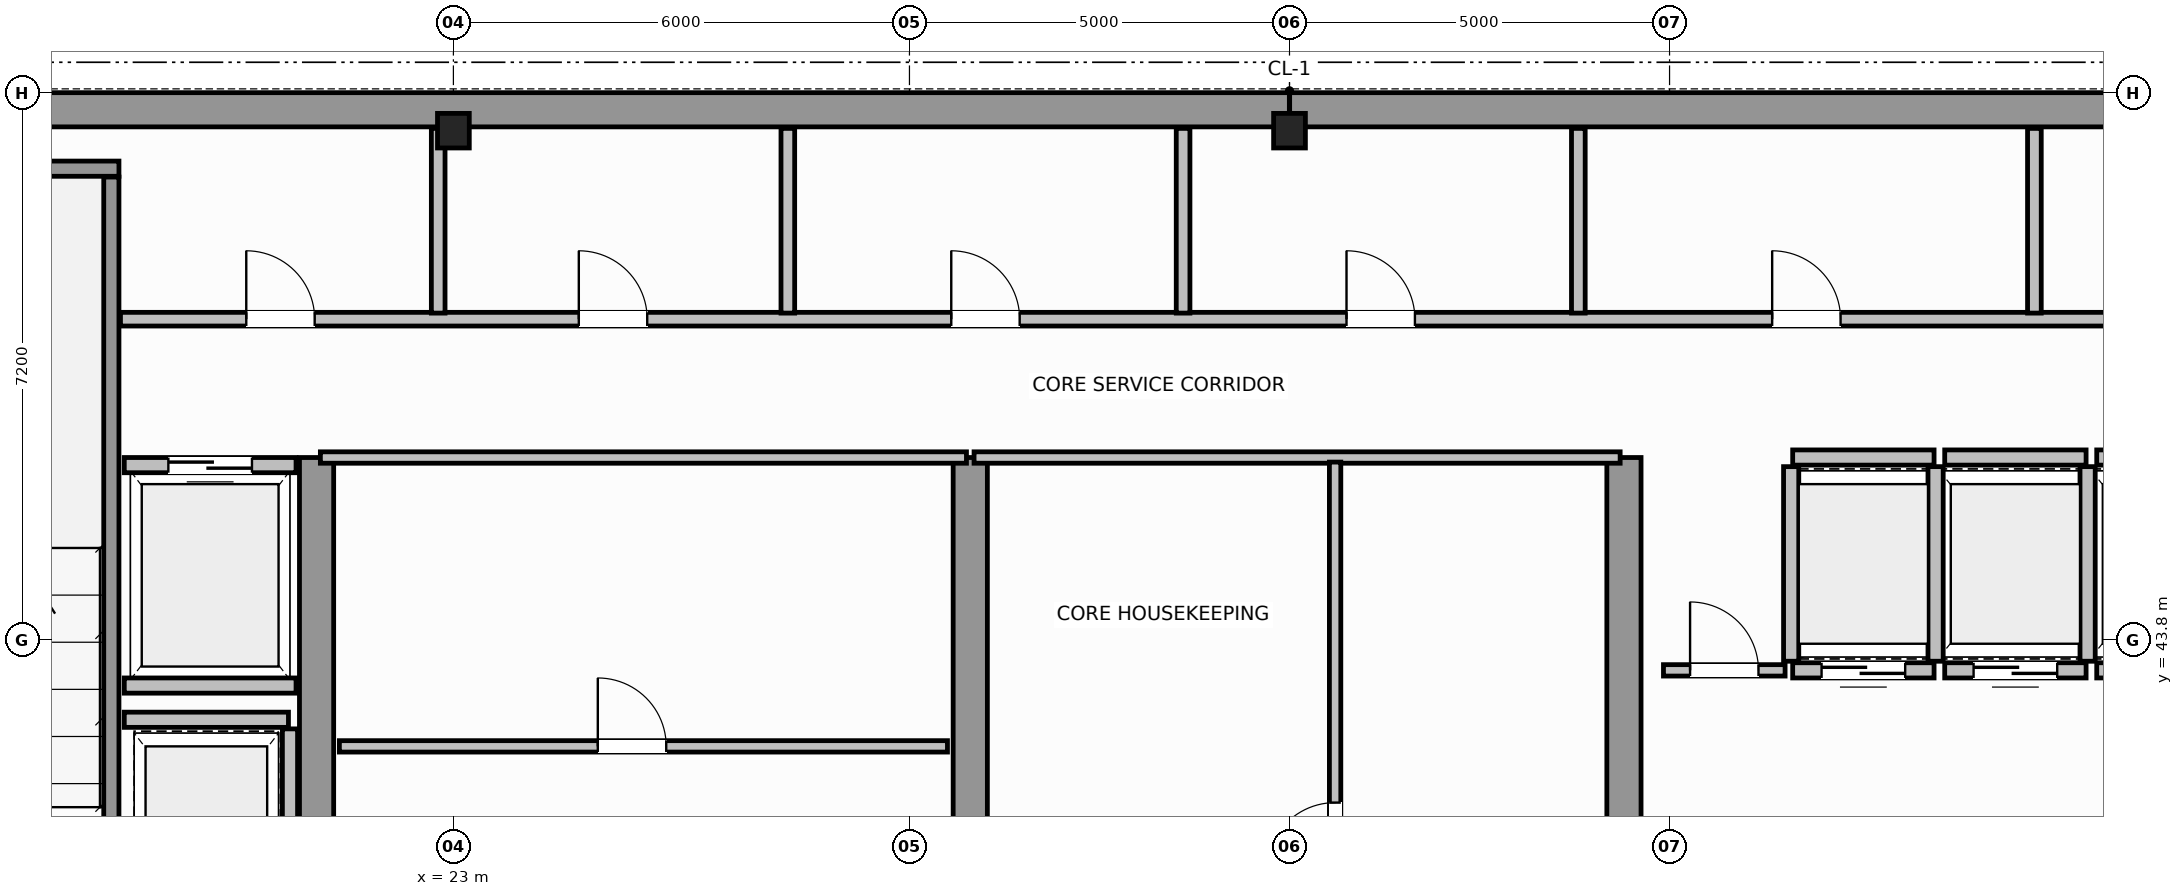
"""IFC4 building model, lengths in metres.
Left out: names, types, materials, properties, quantities, classifications, styles, units other than length and angle.
Written with IfcOpenShell. Run it as: python <this file> out.ifc"""

import sys

from ifc_helpers import new_model, si_unit, direction, frame, frame_2d, origin, origin_2d, place, context, subcontext, project, spatial, rectangle, i_section, extrude, source, transform, mapped, element, fill, save


model = new_model("IFC4")
c1 = context("Model", 3, precision=1e-05, world=origin(), true_north=direction((0.0, 1.0)))
c2 = subcontext(c1, "Body", "Model", "MODEL_VIEW")
j1 = project(units=[si_unit("LENGTHUNIT", "METRE"), si_unit("PLANEANGLEUNIT", "RADIAN")], contexts=[c1])
p1 = place(None, origin())
s1 = spatial("IfcSite", under=j1, at=p1, CompositionType="ELEMENT")
p2 = place(p1, origin())
s2 = spatial("IfcBuilding", under=s1, at=p2, CompositionType="ELEMENT")
p3 = place(p2, frame((0.0, 0.0, 265.0)))
s3 = spatial("IfcBuildingStorey", under=s2, at=p3, CompositionType="ELEMENT", Elevation=265.0)
m1 = source(origin(), c2, "Body", "SweptSolid", [
    extrude(i_section(OverallWidth=0.418, OverallDepth=0.455, WebThickness=0.042, FlangeThickness=0.058, FilletRadius=0.015, at=origin_2d()), origin(), (0.0, 0.0, 1.0), 3.8),
])
for number, where, z_axis, x_axis in (
    (1, (23.0, 50.5, 0.0), (0.0, 0.0, 1.0), (1.0, 0.0, 0.0)),
    (2, (34.0, 50.5, 0.0), (0.0, 0.0, 1.0), (1.0, 0.0, 0.0)),
):
    element("IfcColumn", number, at=place(p3, frame(where, z_axis=z_axis, x_axis=x_axis)), inside=s3, PredefinedType="COLUMN", context=c2, shape_type="MappedRepresentation", body=[
        mapped(m1, transform((0.0, 0.0, 0.0), scale=1.0)),
    ])
for number, where, z_axis, x_axis in (
    (3, (14.229, 50.775, 0.0), (0.0, 0.0, 1.0), (1.0, 0.0, 0.0)),
    (4, (34.002, 50.775, 0.0), (0.0, 0.0, 1.0), (1.0, 0.0, 0.0)),
):
    element("IfcWall", number, at=place(p3, frame(where, z_axis=z_axis, x_axis=x_axis)), inside=s3, PredefinedType="SHEAR", context=c2, shape_type="SweptSolid", body=[
        extrude(rectangle(XDim=19.769, YDim=0.45, at=frame_2d((9.885, 0.0))), origin(), (0.0, 0.0, 1.0), 3.8),
    ])
for number, where, z_axis, x_axis in (
    (5, (21.2, 36.745, 0.0), (0.0, 0.0, 1.0), (0.0, 1.0, 0.0)),
    (6, (29.8, 36.745, 0.0), (0.0, 0.0, 1.0), (0.0, 1.0, 0.0)),
    (7, (38.4, 36.745, 0.0), (0.0, 0.0, 1.0), (0.0, 1.0, 0.0)),
):
    element("IfcWall", number, at=place(p3, frame(where, z_axis=z_axis, x_axis=x_axis)), inside=s3, PredefinedType="SHEAR", context=c2, shape_type="SweptSolid", body=[
        extrude(rectangle(XDim=9.455, YDim=0.45, at=frame_2d((4.728, 0.0))), origin(), (0.0, 0.0, 1.0), 3.8),
    ])
p4 = place(p3, frame((14.225, 50.0, 0.0), z_axis=(0.0, 0.0, 1.0), x_axis=(1.0, 0.0, 0.0)))
e8 = element("IfcWall", 8, at=p4, inside=s3, PredefinedType="SOLIDWALL", context=c2, shape_type="SweptSolid", body=[
    extrude(rectangle(XDim=4.375, YDim=0.2, at=frame_2d((2.188, 0.0))), origin(), (0.0, 0.0, 1.0), 3.8),
])
p5 = place(p3, frame((18.5, 39.96, 0.0), z_axis=(0.0, 0.0, 1.0), x_axis=(0.0, 1.0, 0.0)))
e9 = element("IfcWall", 9, at=p5, inside=s3, PredefinedType="SOLIDWALL", context=c2, shape_type="SweptSolid", body=[
    extrude(rectangle(XDim=9.93, YDim=0.2, at=frame_2d((4.965, 0.0))), origin(), (0.0, 0.0, 1.0), 3.8),
])
p6 = place(p3, frame((40.62, 43.4, 0.0), z_axis=(0.0, 0.0, 1.0), x_axis=(1.0, 0.0, 0.0)))
e10 = element("IfcWall", 10, at=p6, inside=s3, PredefinedType="SOLIDWALL", context=c2, shape_type="SweptSolid", body=[
    extrude(rectangle(XDim=1.86, YDim=0.2, at=frame_2d((0.93, 0.0))), origin(), (0.0, 0.0, 1.0), 3.58),
])
p7 = place(p6, frame((0.38, 0.0, 0.0)))
e11 = element("IfcOpeningElement", 11, at=p7, cuts=e10, PredefinedType="OPENING", context=c2, shape_type="SweptSolid", body=[
    extrude(rectangle(XDim=1.1, YDim=2.15, at=frame_2d((0.55, 1.075))), frame((0.0, 0.11, 0.0), z_axis=(0.0, -1.0, 0.0), x_axis=(1.0, 0.0, 0.0)), (0.0, 0.0, 1.0), 0.22),
])
p8 = place(p3, frame((40.62, 46.2, 0.0), z_axis=(0.0, 0.0, 1.0), x_axis=(1.0, 0.0, 0.0)))
e12 = element("IfcWall", 12, at=p8, inside=s3, PredefinedType="SOLIDWALL", context=c2, shape_type="SweptSolid", body=[
    extrude(rectangle(XDim=1.86, YDim=0.2, at=frame_2d((0.93, 0.0))), origin(), (0.0, 0.0, 1.0), 3.58),
])
for number, where, z_axis, x_axis in (
    (13, (40.6, 43.52, 0.0), (0.0, 0.0, 1.0), (0.0, 1.0, 0.0)),
    (14, (42.5, 43.52, 0.0), (0.0, 0.0, 1.0), (0.0, 1.0, 0.0)),
):
    element("IfcWall", number, at=place(p3, frame(where, z_axis=z_axis, x_axis=x_axis)), inside=s3, PredefinedType="SOLIDWALL", context=c2, shape_type="SweptSolid", body=[
        extrude(rectangle(XDim=2.56, YDim=0.2, at=frame_2d((1.28, 0.0))), origin(), (0.0, 0.0, 1.0), 3.58),
    ])
p9 = place(p3, frame((42.62, 43.4, 0.0), z_axis=(0.0, 0.0, 1.0), x_axis=(1.0, 0.0, 0.0)))
e15 = element("IfcWall", 15, at=p9, inside=s3, PredefinedType="SOLIDWALL", context=c2, shape_type="SweptSolid", body=[
    extrude(rectangle(XDim=1.86, YDim=0.2, at=frame_2d((0.93, 0.0))), origin(), (0.0, 0.0, 1.0), 3.58),
])
p10 = place(p9, frame((0.38, 0.0, 0.0)))
e16 = element("IfcOpeningElement", 16, at=p10, cuts=e15, PredefinedType="OPENING", context=c2, shape_type="SweptSolid", body=[
    extrude(rectangle(XDim=1.1, YDim=2.15, at=frame_2d((0.55, 1.075))), frame((0.0, 0.11, 0.0), z_axis=(0.0, -1.0, 0.0), x_axis=(1.0, 0.0, 0.0)), (0.0, 0.0, 1.0), 0.22),
])
p11 = place(p3, frame((42.62, 46.2, 0.0), z_axis=(0.0, 0.0, 1.0), x_axis=(1.0, 0.0, 0.0)))
e17 = element("IfcWall", 17, at=p11, inside=s3, PredefinedType="SOLIDWALL", context=c2, shape_type="SweptSolid", body=[
    extrude(rectangle(XDim=1.86, YDim=0.2, at=frame_2d((0.93, 0.0))), origin(), (0.0, 0.0, 1.0), 3.58),
])
p12 = place(p3, frame((44.5, 43.52, 0.0), z_axis=(0.0, 0.0, 1.0), x_axis=(0.0, 1.0, 0.0)))
e18 = element("IfcWall", 18, at=p12, inside=s3, PredefinedType="SOLIDWALL", context=c2, shape_type="SweptSolid", body=[
    extrude(rectangle(XDim=2.56, YDim=0.2, at=frame_2d((1.28, 0.0))), origin(), (0.0, 0.0, 1.0), 2.37),
])
p13 = place(p3, frame((44.62, 43.4, 0.0), z_axis=(0.0, 0.0, 1.0), x_axis=(1.0, 0.0, 0.0)))
e19 = element("IfcWall", 19, at=p13, inside=s3, PredefinedType="SOLIDWALL", context=c2, shape_type="SweptSolid", body=[
    extrude(rectangle(XDim=1.86, YDim=0.2, at=frame_2d((0.93, 0.0))), origin(), (0.0, 0.0, 1.0), 3.58),
])
p14 = place(p13, frame((0.38, 0.0, 0.0)))
e20 = element("IfcOpeningElement", 20, at=p14, cuts=e19, PredefinedType="OPENING", context=c2, shape_type="SweptSolid", body=[
    extrude(rectangle(XDim=1.1, YDim=2.15, at=frame_2d((0.55, 1.075))), frame((0.0, 0.11, 0.0), z_axis=(0.0, -1.0, 0.0), x_axis=(1.0, 0.0, 0.0)), (0.0, 0.0, 1.0), 0.22),
])
p15 = place(p3, frame((44.62, 46.2, 0.0), z_axis=(0.0, 0.0, 1.0), x_axis=(1.0, 0.0, 0.0)))
e21 = element("IfcWall", 21, at=p15, inside=s3, PredefinedType="SOLIDWALL", context=c2, shape_type="SweptSolid", body=[
    extrude(rectangle(XDim=1.86, YDim=0.2, at=frame_2d((0.93, 0.0))), origin(), (0.0, 0.0, 1.0), 3.58),
])
p16 = place(p3, frame((18.67, 46.1, 0.0), z_axis=(0.0, 0.0, 1.0), x_axis=(1.0, 0.0, 0.0)))
e22 = element("IfcWall", 22, at=p16, inside=s3, PredefinedType="SOLIDWALL", context=c2, shape_type="SweptSolid", body=[
    extrude(rectangle(XDim=2.26, YDim=0.2, at=frame_2d((1.13, 0.0))), origin(), (0.0, 0.0, 1.0), 3.58),
])
p17 = place(p16, frame((0.58, 0.0, 0.0)))
e23 = element("IfcOpeningElement", 23, at=p17, cuts=e22, PredefinedType="OPENING", context=c2, shape_type="SweptSolid", body=[
    extrude(rectangle(XDim=1.1, YDim=2.15, at=frame_2d((0.55, 1.075))), frame((0.0, 0.11, 0.0), z_axis=(0.0, -1.0, 0.0), x_axis=(1.0, 0.0, 0.0)), (0.0, 0.0, 1.0), 0.22),
])
p18 = place(p3, frame((18.67, 43.2, 0.0), z_axis=(0.0, 0.0, 1.0), x_axis=(1.0, 0.0, 0.0)))
e24 = element("IfcWall", 24, at=p18, inside=s3, PredefinedType="SOLIDWALL", context=c2, shape_type="SweptSolid", body=[
    extrude(rectangle(XDim=2.26, YDim=0.2, at=frame_2d((1.13, 0.0))), origin(), (0.0, 0.0, 1.0), 3.58),
])
p19 = place(p3, frame((18.67, 42.75, 0.0), z_axis=(0.0, 0.0, 1.0), x_axis=(1.0, 0.0, 0.0)))
e25 = element("IfcWall", 25, at=p19, inside=s3, PredefinedType="SOLIDWALL", context=c2, shape_type="SweptSolid", body=[
    extrude(rectangle(XDim=2.16, YDim=0.2, at=frame_2d((1.08, 0.0))), origin(), (0.0, 0.0, 1.0), 3.58),
])
p20 = place(p3, frame((20.85, 40.07, 0.0), z_axis=(0.0, 0.0, 1.0), x_axis=(0.0, 1.0, 0.0)))
e26 = element("IfcWall", 26, at=p20, inside=s3, PredefinedType="SOLIDWALL", context=c2, shape_type="SweptSolid", body=[
    extrude(rectangle(XDim=2.56, YDim=0.2, at=frame_2d((1.28, 0.0))), origin(), (0.0, 0.0, 1.0), 3.58),
])
p21 = place(p3, frame((21.25, 46.2, 0.0), z_axis=(0.0, 0.0, 1.0), x_axis=(1.0, 0.0, 0.0)))
e27 = element("IfcWall", 27, at=p21, inside=s3, PredefinedType="PARTITIONING", context=c2, shape_type="SweptSolid", body=[
    extrude(rectangle(XDim=8.5, YDim=0.15, at=frame_2d((4.25, 0.0))), origin(), (0.0, 0.0, 1.0), 3.58),
])
p22 = place(p3, frame((21.5, 42.4, 0.0), z_axis=(0.0, 0.0, 1.0), x_axis=(1.0, 0.0, 0.0)))
e28 = element("IfcWall", 28, at=p22, inside=s3, PredefinedType="PARTITIONING", context=c2, shape_type="SweptSolid", body=[
    extrude(rectangle(XDim=8.0, YDim=0.15, at=frame_2d((4.0, 0.0))), origin(), (0.0, 0.0, 1.0), 3.58),
])
p23 = place(p22, frame((3.4, 0.0, 0.0)))
e29 = element("IfcOpeningElement", 29, at=p23, cuts=e28, PredefinedType="OPENING", context=c2, shape_type="SweptSolid", body=[
    extrude(rectangle(XDim=0.9, YDim=2.1, at=frame_2d((0.45, 1.05))), frame((0.0, 0.085, 0.0), z_axis=(0.0, -1.0, 0.0), x_axis=(1.0, 0.0, 0.0)), (0.0, 0.0, 1.0), 0.17),
])
p24 = place(p3, frame((29.85, 46.2, 0.0), z_axis=(0.0, 0.0, 1.0), x_axis=(1.0, 0.0, 0.0)))
e30 = element("IfcWall", 30, at=p24, inside=s3, PredefinedType="PARTITIONING", context=c2, shape_type="SweptSolid", body=[
    extrude(rectangle(XDim=8.5, YDim=0.15, at=frame_2d((4.25, 0.0))), origin(), (0.0, 0.0, 1.0), 3.58),
])
p25 = place(p3, frame((34.6, 36.56, 0.0), z_axis=(0.0, 0.0, 1.0), x_axis=(0.0, 1.0, 0.0)))
e31 = element("IfcWall", 31, at=p25, inside=s3, PredefinedType="PARTITIONING", context=c2, shape_type="SweptSolid", body=[
    extrude(rectangle(XDim=9.58, YDim=0.15, at=frame_2d((4.79, 0.0))), origin(), (0.0, 0.0, 1.0), 3.58),
])
p26 = place(p25, frame((4.2, 0.0, 0.0)))
e32 = element("IfcOpeningElement", 32, at=p26, cuts=e31, PredefinedType="OPENING", context=c2, shape_type="SweptSolid", body=[
    extrude(rectangle(XDim=0.9, YDim=2.1, at=frame_2d((0.45, 1.05))), frame((0.0, 0.085, 0.0), z_axis=(0.0, -1.0, 0.0), x_axis=(1.0, 0.0, 0.0)), (0.0, 0.0, 1.0), 0.17),
])
p27 = place(p3, frame((38.92, 43.4, 0.0), z_axis=(0.0, 0.0, 1.0), x_axis=(1.0, 0.0, 0.0)))
e33 = element("IfcWall", 33, at=p27, inside=s3, PredefinedType="PARTITIONING", context=c2, shape_type="SweptSolid", body=[
    extrude(rectangle(XDim=1.6, YDim=0.15, at=frame_2d((0.8, 0.0))), origin(), (0.0, 0.0, 1.0), 3.58),
])
p28 = place(p27, frame((0.35, 0.0, 0.0)))
e34 = element("IfcOpeningElement", 34, at=p28, cuts=e33, PredefinedType="OPENING", context=c2, shape_type="SweptSolid", body=[
    extrude(rectangle(XDim=0.9, YDim=2.1, at=frame_2d((0.45, 1.05))), frame((0.0, 0.085, 0.0), z_axis=(0.0, -1.0, 0.0), x_axis=(1.0, 0.0, 0.0)), (0.0, 0.0, 1.0), 0.17),
])
p29 = place(p3, frame((18.62, 48.02, 0.0), z_axis=(0.0, 0.0, 1.0), x_axis=(1.0, 0.0, 0.0)))
e35 = element("IfcWall", 35, at=p29, inside=s3, PredefinedType="PLUMBINGWALL", context=c2, shape_type="SweptSolid", body=[
    extrude(rectangle(XDim=30.76, YDim=0.18, at=frame_2d((15.38, 0.0))), origin(), (0.0, 0.0, 1.0), 3.58),
])
p30 = place(p29, frame((1.655, 0.0, 0.0)))
e36 = element("IfcOpeningElement", 36, at=p30, cuts=e35, PredefinedType="OPENING", context=c2, shape_type="SweptSolid", body=[
    extrude(rectangle(XDim=0.9, YDim=2.15, at=frame_2d((0.45, 1.075))), frame((0.0, 0.1, 0.0), z_axis=(0.0, -1.0, 0.0), x_axis=(1.0, 0.0, 0.0)), (0.0, 0.0, 1.0), 0.2),
])
p31 = place(p29, frame((6.03, 0.0, 0.0)))
e37 = element("IfcOpeningElement", 37, at=p31, cuts=e35, PredefinedType="OPENING", context=c2, shape_type="SweptSolid", body=[
    extrude(rectangle(XDim=0.9, YDim=2.15, at=frame_2d((0.45, 1.075))), frame((0.0, 0.1, 0.0), z_axis=(0.0, -1.0, 0.0), x_axis=(1.0, 0.0, 0.0)), (0.0, 0.0, 1.0), 0.2),
])
p32 = place(p29, frame((10.93, 0.0, 0.0)))
e38 = element("IfcOpeningElement", 38, at=p32, cuts=e35, PredefinedType="OPENING", context=c2, shape_type="SweptSolid", body=[
    extrude(rectangle(XDim=0.9, YDim=2.15, at=frame_2d((0.45, 1.075))), frame((0.0, 0.1, 0.0), z_axis=(0.0, -1.0, 0.0), x_axis=(1.0, 0.0, 0.0)), (0.0, 0.0, 1.0), 0.2),
])
p33 = place(p29, frame((16.13, 0.0, 0.0)))
e39 = element("IfcOpeningElement", 39, at=p33, cuts=e35, PredefinedType="OPENING", context=c2, shape_type="SweptSolid", body=[
    extrude(rectangle(XDim=0.9, YDim=2.15, at=frame_2d((0.45, 1.075))), frame((0.0, 0.1, 0.0), z_axis=(0.0, -1.0, 0.0), x_axis=(1.0, 0.0, 0.0)), (0.0, 0.0, 1.0), 0.2),
])
p34 = place(p29, frame((21.73, 0.0, 0.0)))
e40 = element("IfcOpeningElement", 40, at=p34, cuts=e35, PredefinedType="OPENING", context=c2, shape_type="SweptSolid", body=[
    extrude(rectangle(XDim=0.9, YDim=2.15, at=frame_2d((0.45, 1.075))), frame((0.0, 0.1, 0.0), z_axis=(0.0, -1.0, 0.0), x_axis=(1.0, 0.0, 0.0)), (0.0, 0.0, 1.0), 0.2),
])
p35 = place(p29, frame((27.505, 0.0, 0.0)))
e41 = element("IfcOpeningElement", 41, at=p35, cuts=e35, PredefinedType="OPENING", context=c2, shape_type="SweptSolid", body=[
    extrude(rectangle(XDim=0.9, YDim=2.15, at=frame_2d((0.45, 1.075))), frame((0.0, 0.1, 0.0), z_axis=(0.0, -1.0, 0.0), x_axis=(1.0, 0.0, 0.0)), (0.0, 0.0, 1.0), 0.2),
])
p36 = place(p3, frame((22.8, 48.1, 0.0), z_axis=(0.0, 0.0, 1.0), x_axis=(0.0, 1.0, 0.0)))
e42 = element("IfcWall", 42, at=p36, inside=s3, PredefinedType="PLUMBINGWALL", context=c2, shape_type="SweptSolid", body=[
    extrude(rectangle(XDim=2.43, YDim=0.18, at=frame_2d((1.215, 0.0))), origin(), (0.0, 0.0, 1.0), 2.37),
])
for number, where, z_axis, x_axis in (
    (43, (27.4, 48.1, 0.0), (0.0, 0.0, 1.0), (0.0, 1.0, 0.0)),
    (44, (32.6, 48.1, 0.0), (0.0, 0.0, 1.0), (0.0, 1.0, 0.0)),
    (45, (37.8, 48.1, 0.0), (0.0, 0.0, 1.0), (0.0, 1.0, 0.0)),
    (46, (43.8, 48.1, 0.0), (0.0, 0.0, 1.0), (0.0, 1.0, 0.0)),
):
    element("IfcWall", number, at=place(p3, frame(where, z_axis=z_axis, x_axis=x_axis)), inside=s3, PredefinedType="PLUMBINGWALL", context=c2, shape_type="SweptSolid", body=[
        extrude(rectangle(XDim=2.43, YDim=0.18, at=frame_2d((1.215, 0.0))), origin(), (0.0, 0.0, 1.0), 3.58),
    ])
m2 = source(origin(), c2, "Body", "SweptSolid", [
    extrude(rectangle(XDim=1.1, YDim=2.15, at=frame_2d((0.55, 1.075))), frame((0.0, 0.025, 0.0), z_axis=(0.0, -1.0, 0.0), x_axis=(1.0, 0.0, 0.0)), (0.0, 0.0, 1.0), 0.05),
])
p37 = place(p7, origin())
e47 = element("IfcDoor", 47, at=p37, inside=s3, OperationType="DOUBLE_DOOR_SLIDING", PredefinedType="DOOR", context=c2, shape_type="MappedRepresentation", body=[
    mapped(m2, transform((0.0, 0.0, 0.0), scale=1.0)),
])
fill(e11, e47)
p38 = place(p10, origin())
e48 = element("IfcDoor", 48, at=p38, inside=s3, OperationType="DOUBLE_DOOR_SLIDING", PredefinedType="DOOR", context=c2, shape_type="MappedRepresentation", body=[
    mapped(m2, transform((0.0, 0.0, 0.0), scale=1.0)),
])
fill(e16, e48)
p39 = place(p17, origin())
e49 = element("IfcDoor", 49, at=p39, inside=s3, OperationType="DOUBLE_DOOR_SLIDING", PredefinedType="DOOR", context=c2, shape_type="MappedRepresentation", body=[
    mapped(m2, transform((0.0, 0.0, 0.0), scale=1.0)),
])
fill(e23, e49)
m3 = source(origin(), c2, "Body", "SweptSolid", [
    extrude(rectangle(XDim=0.9, YDim=2.1, at=frame_2d((0.45, 1.05))), frame((0.0, 0.025, 0.0), z_axis=(0.0, -1.0, 0.0), x_axis=(1.0, 0.0, 0.0)), (0.0, 0.0, 1.0), 0.05),
])
p40 = place(p23, origin())
e50 = element("IfcDoor", 50, at=p40, inside=s3, OperationType="SINGLE_SWING_RIGHT", PredefinedType="DOOR", context=c2, shape_type="MappedRepresentation", body=[
    mapped(m3, transform((0.0, 0.0, 0.0), scale=1.0)),
])
fill(e29, e50)
p41 = place(p26, origin())
e51 = element("IfcDoor", 51, at=p41, inside=s3, OperationType="SINGLE_SWING_RIGHT", PredefinedType="DOOR", context=c2, shape_type="MappedRepresentation", body=[
    mapped(m3, transform((0.0, 0.0, 0.0), scale=1.0)),
])
fill(e32, e51)
p42 = place(p28, origin())
e52 = element("IfcDoor", 52, at=p42, inside=s3, OperationType="SINGLE_SWING_LEFT", PredefinedType="DOOR", context=c2, shape_type="MappedRepresentation", body=[
    mapped(m3, transform((0.0, 0.0, 0.0), scale=1.0)),
])
fill(e34, e52)
m4 = source(origin(), c2, "Body", "SweptSolid", [
    extrude(rectangle(XDim=0.9, YDim=2.15, at=frame_2d((0.45, 1.075))), frame((0.0, 0.025, 0.0), z_axis=(0.0, -1.0, 0.0), x_axis=(1.0, 0.0, 0.0)), (0.0, 0.0, 1.0), 0.05),
])
p43 = place(p30, origin())
e53 = element("IfcDoor", 53, at=p43, inside=s3, OperationType="SINGLE_SWING_LEFT", PredefinedType="DOOR", context=c2, shape_type="MappedRepresentation", body=[
    mapped(m4, transform((0.0, 0.0, 0.0), scale=1.0)),
])
fill(e36, e53)
p44 = place(p31, origin())
e54 = element("IfcDoor", 54, at=p44, inside=s3, OperationType="SINGLE_SWING_RIGHT", PredefinedType="DOOR", context=c2, shape_type="MappedRepresentation", body=[
    mapped(m4, transform((0.0, 0.0, 0.0), scale=1.0)),
])
fill(e37, e54)
p45 = place(p32, origin())
e55 = element("IfcDoor", 55, at=p45, inside=s3, OperationType="SINGLE_SWING_LEFT", PredefinedType="DOOR", context=c2, shape_type="MappedRepresentation", body=[
    mapped(m4, transform((0.0, 0.0, 0.0), scale=1.0)),
])
fill(e38, e55)
p46 = place(p33, origin())
e56 = element("IfcDoor", 56, at=p46, inside=s3, OperationType="SINGLE_SWING_RIGHT", PredefinedType="DOOR", context=c2, shape_type="MappedRepresentation", body=[
    mapped(m4, transform((0.0, 0.0, 0.0), scale=1.0)),
])
fill(e39, e56)
p47 = place(p34, origin())
e57 = element("IfcDoor", 57, at=p47, inside=s3, OperationType="SINGLE_SWING_LEFT", PredefinedType="DOOR", context=c2, shape_type="MappedRepresentation", body=[
    mapped(m4, transform((0.0, 0.0, 0.0), scale=1.0)),
])
fill(e40, e57)
save(model, sys.argv[1])
